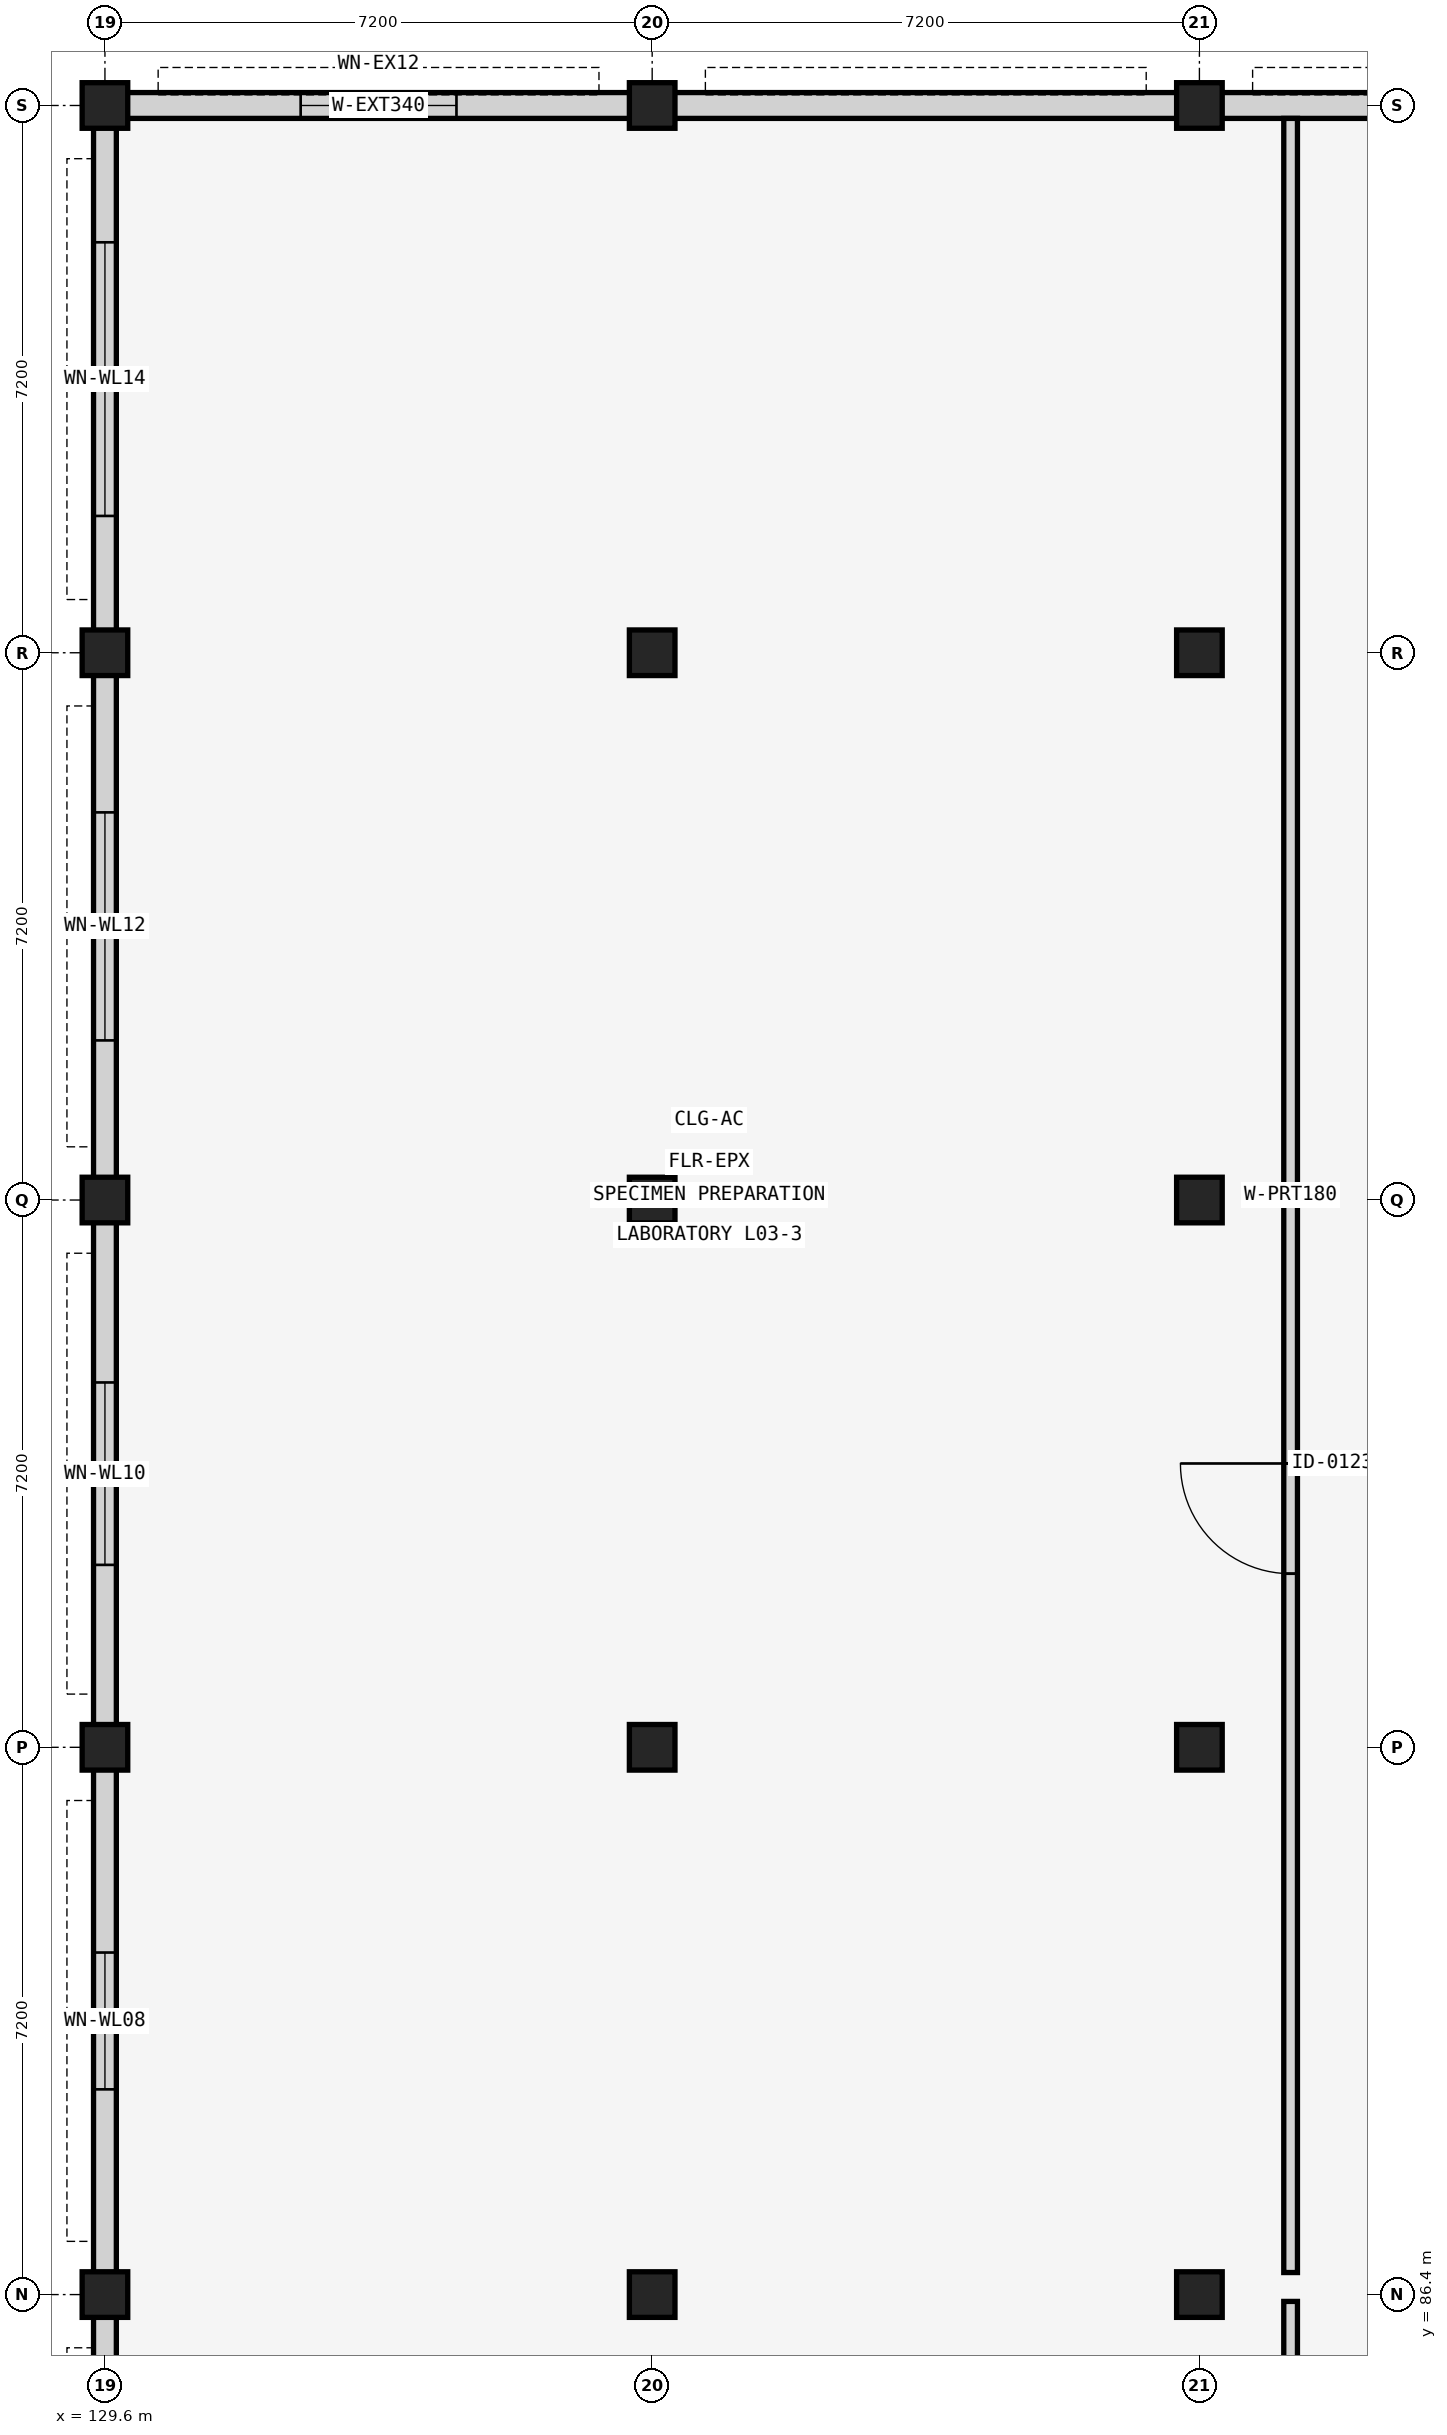
"""IFC4 building model, lengths in metres.
Left out: names, types, materials, properties, quantities, classifications, styles, units other than length and angle.
Written with IfcOpenShell. Run it as: python <this file> out.ifc"""

import sys

from ifc_helpers import new_model, si_unit, direction, frame, frame_2d, origin, origin_2d, place, context, subcontext, project, spatial, rectangle, extrude, element, fill, save


model = new_model("IFC4")
c1 = context("Model", 3, precision=1e-05, world=origin(), true_north=direction((0.0, 1.0)))
c2 = subcontext(c1, "Body", "Model", "MODEL_VIEW")
j1 = project(units=[si_unit("LENGTHUNIT", "METRE"), si_unit("PLANEANGLEUNIT", "RADIAN")], contexts=[c1])
p1 = place(None, origin())
s1 = spatial("IfcSite", under=j1, at=p1, CompositionType="ELEMENT")
p2 = place(p1, origin())
s2 = spatial("IfcBuilding", under=s1, at=p2, CompositionType="ELEMENT")
p3 = place(p2, frame((0.0, 0.0, 13.12)))
s3 = spatial("IfcBuildingStorey", under=s2, at=p3, CompositionType="ELEMENT", Elevation=13.12)
for number, where, z_axis, x_axis in (
    (1, (129.6, 86.4, 0.0), (0.0, 0.0, 1.0), (1.0, 0.0, 0.0)),
    (2, (129.6, 93.6, 0.0), (0.0, 0.0, 1.0), (1.0, 0.0, 0.0)),
    (3, (129.6, 100.8, 0.0), (0.0, 0.0, 1.0), (1.0, 0.0, 0.0)),
    (4, (129.6, 108.0, 0.0), (0.0, 0.0, 1.0), (1.0, 0.0, 0.0)),
    (5, (129.6, 115.2, 0.0), (0.0, 0.0, 1.0), (1.0, 0.0, 0.0)),
    (6, (136.8, 86.4, 0.0), (0.0, 0.0, 1.0), (1.0, 0.0, 0.0)),
    (7, (136.8, 93.6, 0.0), (0.0, 0.0, 1.0), (1.0, 0.0, 0.0)),
    (8, (136.8, 100.8, 0.0), (0.0, 0.0, 1.0), (1.0, 0.0, 0.0)),
    (9, (136.8, 108.0, 0.0), (0.0, 0.0, 1.0), (1.0, 0.0, 0.0)),
    (10, (136.8, 115.2, 0.0), (0.0, 0.0, 1.0), (1.0, 0.0, 0.0)),
    (11, (144.0, 86.4, 0.0), (0.0, 0.0, 1.0), (1.0, 0.0, 0.0)),
    (12, (144.0, 93.6, 0.0), (0.0, 0.0, 1.0), (1.0, 0.0, 0.0)),
    (13, (144.0, 100.8, 0.0), (0.0, 0.0, 1.0), (1.0, 0.0, 0.0)),
    (14, (144.0, 108.0, 0.0), (0.0, 0.0, 1.0), (1.0, 0.0, 0.0)),
    (15, (144.0, 115.2, 0.0), (0.0, 0.0, 1.0), (1.0, 0.0, 0.0)),
):
    element("IfcColumn", number, at=place(p3, frame(where, z_axis=z_axis, x_axis=x_axis)), inside=s3, PredefinedType="COLUMN", context=c2, shape_type="SweptSolid", body=[
        extrude(rectangle(XDim=0.6, YDim=0.6, at=origin_2d()), origin(), (0.0, 0.0, 1.0), 4.16),
    ])
p4 = place(p3, frame((129.89, 115.2, 0.0), z_axis=(0.0, 0.0, 1.0), x_axis=(1.0, 0.0, 0.0)))
e16 = element("IfcWall", 16, at=p4, inside=s3, PredefinedType="SOLIDWALL", context=c2, shape_type="SweptSolid", body=[
    extrude(rectangle(XDim=6.62, YDim=0.34, at=frame_2d((3.31, 0.0))), origin(), (0.0, 0.0, 1.0), 3.21),
])
p5 = place(p4, frame((2.285, 0.0, 0.95)))
e17 = element("IfcOpeningElement", 17, at=p5, cuts=e16, PredefinedType="OPENING", context=c2, shape_type="SweptSolid", body=[
    extrude(rectangle(XDim=2.05, YDim=1.7, at=frame_2d((1.025, 0.85))), frame((0.0, 0.18, 0.0), z_axis=(0.0, -1.0, 0.0), x_axis=(1.0, 0.0, 0.0)), (0.0, 0.0, 1.0), 0.36),
])
p6 = place(p3, frame((137.09, 115.2, 0.0), z_axis=(0.0, 0.0, 1.0), x_axis=(1.0, 0.0, 0.0)))
e18 = element("IfcWall", 18, at=p6, inside=s3, PredefinedType="SOLIDWALL", context=c2, shape_type="SweptSolid", body=[
    extrude(rectangle(XDim=6.62, YDim=0.34, at=frame_2d((3.31, 0.0))), origin(), (0.0, 0.0, 1.0), 3.21),
])
p7 = place(p3, frame((144.29, 115.2, 0.0), z_axis=(0.0, 0.0, 1.0), x_axis=(1.0, 0.0, 0.0)))
e19 = element("IfcWall", 19, at=p7, inside=s3, PredefinedType="SOLIDWALL", context=c2, shape_type="SweptSolid", body=[
    extrude(rectangle(XDim=6.62, YDim=0.34, at=frame_2d((3.31, 0.0))), origin(), (0.0, 0.0, 1.0), 3.21),
])
p8 = place(p7, frame((2.135, 0.0, 0.95)))
e20 = element("IfcOpeningElement", 20, at=p8, cuts=e19, PredefinedType="OPENING", context=c2, shape_type="SweptSolid", body=[
    extrude(rectangle(XDim=2.35, YDim=1.6, at=frame_2d((1.175, 0.8))), frame((0.0, 0.18, 0.0), z_axis=(0.0, -1.0, 0.0), x_axis=(1.0, 0.0, 0.0)), (0.0, 0.0, 1.0), 0.36),
])
p9 = place(p3, frame((129.6, 79.49, 0.0), z_axis=(0.0, 0.0, 1.0), x_axis=(0.0, 1.0, 0.0)))
e21 = element("IfcWall", 21, at=p9, inside=s3, PredefinedType="SOLIDWALL", context=c2, shape_type="SweptSolid", body=[
    extrude(rectangle(XDim=6.62, YDim=0.3, at=frame_2d((3.31, 0.0))), origin(), (0.0, 0.0, 1.0), 3.16),
])
p10 = place(p9, frame((1.66, 0.0, 0.9)))
e22 = element("IfcOpeningElement", 22, at=p10, cuts=e21, PredefinedType="OPENING", context=c2, shape_type="SweptSolid", body=[
    extrude(rectangle(XDim=3.3, YDim=2.1, at=frame_2d((1.65, 1.05))), frame((0.0, 0.16, 0.0), z_axis=(0.0, -1.0, 0.0), x_axis=(1.0, 0.0, 0.0)), (0.0, 0.0, 1.0), 0.32),
])
p11 = place(p3, frame((129.6, 86.69, 0.0), z_axis=(0.0, 0.0, 1.0), x_axis=(0.0, 1.0, 0.0)))
e23 = element("IfcWall", 23, at=p11, inside=s3, PredefinedType="SOLIDWALL", context=c2, shape_type="SweptSolid", body=[
    extrude(rectangle(XDim=6.62, YDim=0.3, at=frame_2d((3.31, 0.0))), origin(), (0.0, 0.0, 1.0), 3.16),
])
p12 = place(p11, frame((2.41, 0.0, 0.95)))
e24 = element("IfcOpeningElement", 24, at=p12, cuts=e23, PredefinedType="OPENING", context=c2, shape_type="SweptSolid", body=[
    extrude(rectangle(XDim=1.8, YDim=1.8, at=frame_2d((0.9, 0.9))), frame((0.0, 0.16, 0.0), z_axis=(0.0, -1.0, 0.0), x_axis=(1.0, 0.0, 0.0)), (0.0, 0.0, 1.0), 0.32),
])
p13 = place(p3, frame((129.6, 93.89, 0.0), z_axis=(0.0, 0.0, 1.0), x_axis=(0.0, 1.0, 0.0)))
e25 = element("IfcWall", 25, at=p13, inside=s3, PredefinedType="SOLIDWALL", context=c2, shape_type="SweptSolid", body=[
    extrude(rectangle(XDim=6.62, YDim=0.3, at=frame_2d((3.31, 0.0))), origin(), (0.0, 0.0, 1.0), 3.16),
])
p14 = place(p13, frame((2.11, 0.0, 0.95)))
e26 = element("IfcOpeningElement", 26, at=p14, cuts=e25, PredefinedType="OPENING", context=c2, shape_type="SweptSolid", body=[
    extrude(rectangle(XDim=2.4, YDim=1.8, at=frame_2d((1.2, 0.9))), frame((0.0, 0.16, 0.0), z_axis=(0.0, -1.0, 0.0), x_axis=(1.0, 0.0, 0.0)), (0.0, 0.0, 1.0), 0.32),
])
p15 = place(p3, frame((129.6, 101.09, 0.0), z_axis=(0.0, 0.0, 1.0), x_axis=(0.0, 1.0, 0.0)))
e27 = element("IfcWall", 27, at=p15, inside=s3, PredefinedType="SOLIDWALL", context=c2, shape_type="SweptSolid", body=[
    extrude(rectangle(XDim=6.62, YDim=0.3, at=frame_2d((3.31, 0.0))), origin(), (0.0, 0.0, 1.0), 3.16),
])
p16 = place(p15, frame((1.81, 0.0, 0.95)))
e28 = element("IfcOpeningElement", 28, at=p16, cuts=e27, PredefinedType="OPENING", context=c2, shape_type="SweptSolid", body=[
    extrude(rectangle(XDim=3.0, YDim=1.8, at=frame_2d((1.5, 0.9))), frame((0.0, 0.16, 0.0), z_axis=(0.0, -1.0, 0.0), x_axis=(1.0, 0.0, 0.0)), (0.0, 0.0, 1.0), 0.32),
])
p17 = place(p3, frame((129.6, 108.29, 0.0), z_axis=(0.0, 0.0, 1.0), x_axis=(0.0, 1.0, 0.0)))
e29 = element("IfcWall", 29, at=p17, inside=s3, PredefinedType="SOLIDWALL", context=c2, shape_type="SweptSolid", body=[
    extrude(rectangle(XDim=6.62, YDim=0.3, at=frame_2d((3.31, 0.0))), origin(), (0.0, 0.0, 1.0), 3.16),
])
p18 = place(p17, frame((1.51, 0.0, 0.95)))
e30 = element("IfcOpeningElement", 30, at=p18, cuts=e29, PredefinedType="OPENING", context=c2, shape_type="SweptSolid", body=[
    extrude(rectangle(XDim=3.6, YDim=1.8, at=frame_2d((1.8, 0.9))), frame((0.0, 0.16, 0.0), z_axis=(0.0, -1.0, 0.0), x_axis=(1.0, 0.0, 0.0)), (0.0, 0.0, 1.0), 0.32),
])
p19 = place(p3, frame((145.2, 65.09, 0.0), z_axis=(0.0, 0.0, 1.0), x_axis=(0.0, 1.0, 0.0)))
e31 = element("IfcWall", 31, at=p19, inside=s3, PredefinedType="PARTITIONING", context=c2, shape_type="SweptSolid", body=[
    extrude(rectangle(XDim=21.22, YDim=0.18, at=frame_2d((10.61, 0.0))), origin(), (0.0, 0.0, 1.0), 3.16),
])
p20 = place(p19, frame((9.96, 0.0, 0.0)))
e32 = element("IfcOpeningElement", 32, at=p20, cuts=e31, PredefinedType="OPENING", context=c2, shape_type="SweptSolid", body=[
    extrude(rectangle(XDim=1.3, YDim=2.15, at=frame_2d((0.65, 1.075))), frame((0.0, 0.1, 0.0), z_axis=(0.0, -1.0, 0.0), x_axis=(1.0, 0.0, 0.0)), (0.0, 0.0, 1.0), 0.2),
])
p21 = place(p3, frame((145.2, 86.69, 0.0), z_axis=(0.0, 0.0, 1.0), x_axis=(0.0, 1.0, 0.0)))
e33 = element("IfcWall", 33, at=p21, inside=s3, PredefinedType="PARTITIONING", context=c2, shape_type="SweptSolid", body=[
    extrude(rectangle(XDim=28.34, YDim=0.18, at=frame_2d((14.17, 0.0))), origin(), (0.0, 0.0, 1.0), 3.16),
])
p22 = place(p21, frame((9.194, 0.0, 0.0)))
e34 = element("IfcOpeningElement", 34, at=p22, cuts=e33, PredefinedType="OPENING", context=c2, shape_type="SweptSolid", body=[
    extrude(rectangle(XDim=1.45, YDim=2.2, at=frame_2d((0.725, 1.1))), frame((0.0, 0.1, 0.0), z_axis=(0.0, -1.0, 0.0), x_axis=(1.0, 0.0, 0.0)), (0.0, 0.0, 1.0), 0.2),
])
p23 = place(p5, origin())
e35 = element("IfcWindow", 35, at=p23, inside=s3, PartitioningType="SINGLE_PANEL", PredefinedType="WINDOW", context=c2, shape_type="SweptSolid", body=[
    extrude(rectangle(XDim=2.05, YDim=1.7, at=frame_2d((1.025, 0.85))), frame((0.0, 0.03, 0.0), z_axis=(0.0, -1.0, 0.0), x_axis=(1.0, 0.0, 0.0)), (0.0, 0.0, 1.0), 0.06),
])
fill(e17, e35)
p24 = place(p12, origin())
e36 = element("IfcWindow", 36, at=p24, inside=s3, PartitioningType="SINGLE_PANEL", PredefinedType="WINDOW", context=c2, shape_type="SweptSolid", body=[
    extrude(rectangle(XDim=1.8, YDim=1.8, at=frame_2d((0.9, 0.9))), frame((0.0, 0.03, 0.0), z_axis=(0.0, -1.0, 0.0), x_axis=(1.0, 0.0, 0.0)), (0.0, 0.0, 1.0), 0.06),
])
fill(e24, e36)
p25 = place(p14, origin())
e37 = element("IfcWindow", 37, at=p25, inside=s3, PartitioningType="SINGLE_PANEL", PredefinedType="WINDOW", context=c2, shape_type="SweptSolid", body=[
    extrude(rectangle(XDim=2.4, YDim=1.8, at=frame_2d((1.2, 0.9))), frame((0.0, 0.03, 0.0), z_axis=(0.0, -1.0, 0.0), x_axis=(1.0, 0.0, 0.0)), (0.0, 0.0, 1.0), 0.06),
])
fill(e26, e37)
p26 = place(p16, origin())
e38 = element("IfcWindow", 38, at=p26, inside=s3, PartitioningType="SINGLE_PANEL", PredefinedType="WINDOW", context=c2, shape_type="SweptSolid", body=[
    extrude(rectangle(XDim=3.0, YDim=1.8, at=frame_2d((1.5, 0.9))), frame((0.0, 0.03, 0.0), z_axis=(0.0, -1.0, 0.0), x_axis=(1.0, 0.0, 0.0)), (0.0, 0.0, 1.0), 0.06),
])
fill(e28, e38)
p27 = place(p18, origin())
e39 = element("IfcWindow", 39, at=p27, inside=s3, PartitioningType="SINGLE_PANEL", PredefinedType="WINDOW", context=c2, shape_type="SweptSolid", body=[
    extrude(rectangle(XDim=3.6, YDim=1.8, at=frame_2d((1.8, 0.9))), frame((0.0, 0.03, 0.0), z_axis=(0.0, -1.0, 0.0), x_axis=(1.0, 0.0, 0.0)), (0.0, 0.0, 1.0), 0.06),
])
fill(e30, e39)
p28 = place(p22, origin())
e40 = element("IfcDoor", 40, at=p28, inside=s3, OperationType="SINGLE_SWING_RIGHT", PredefinedType="DOOR", context=c2, shape_type="SweptSolid", body=[
    extrude(rectangle(XDim=1.45, YDim=2.2, at=frame_2d((0.725, 1.1))), frame((0.0, 0.025, 0.0), z_axis=(0.0, -1.0, 0.0), x_axis=(1.0, 0.0, 0.0)), (0.0, 0.0, 1.0), 0.05),
])
fill(e34, e40)
save(model, sys.argv[1])
